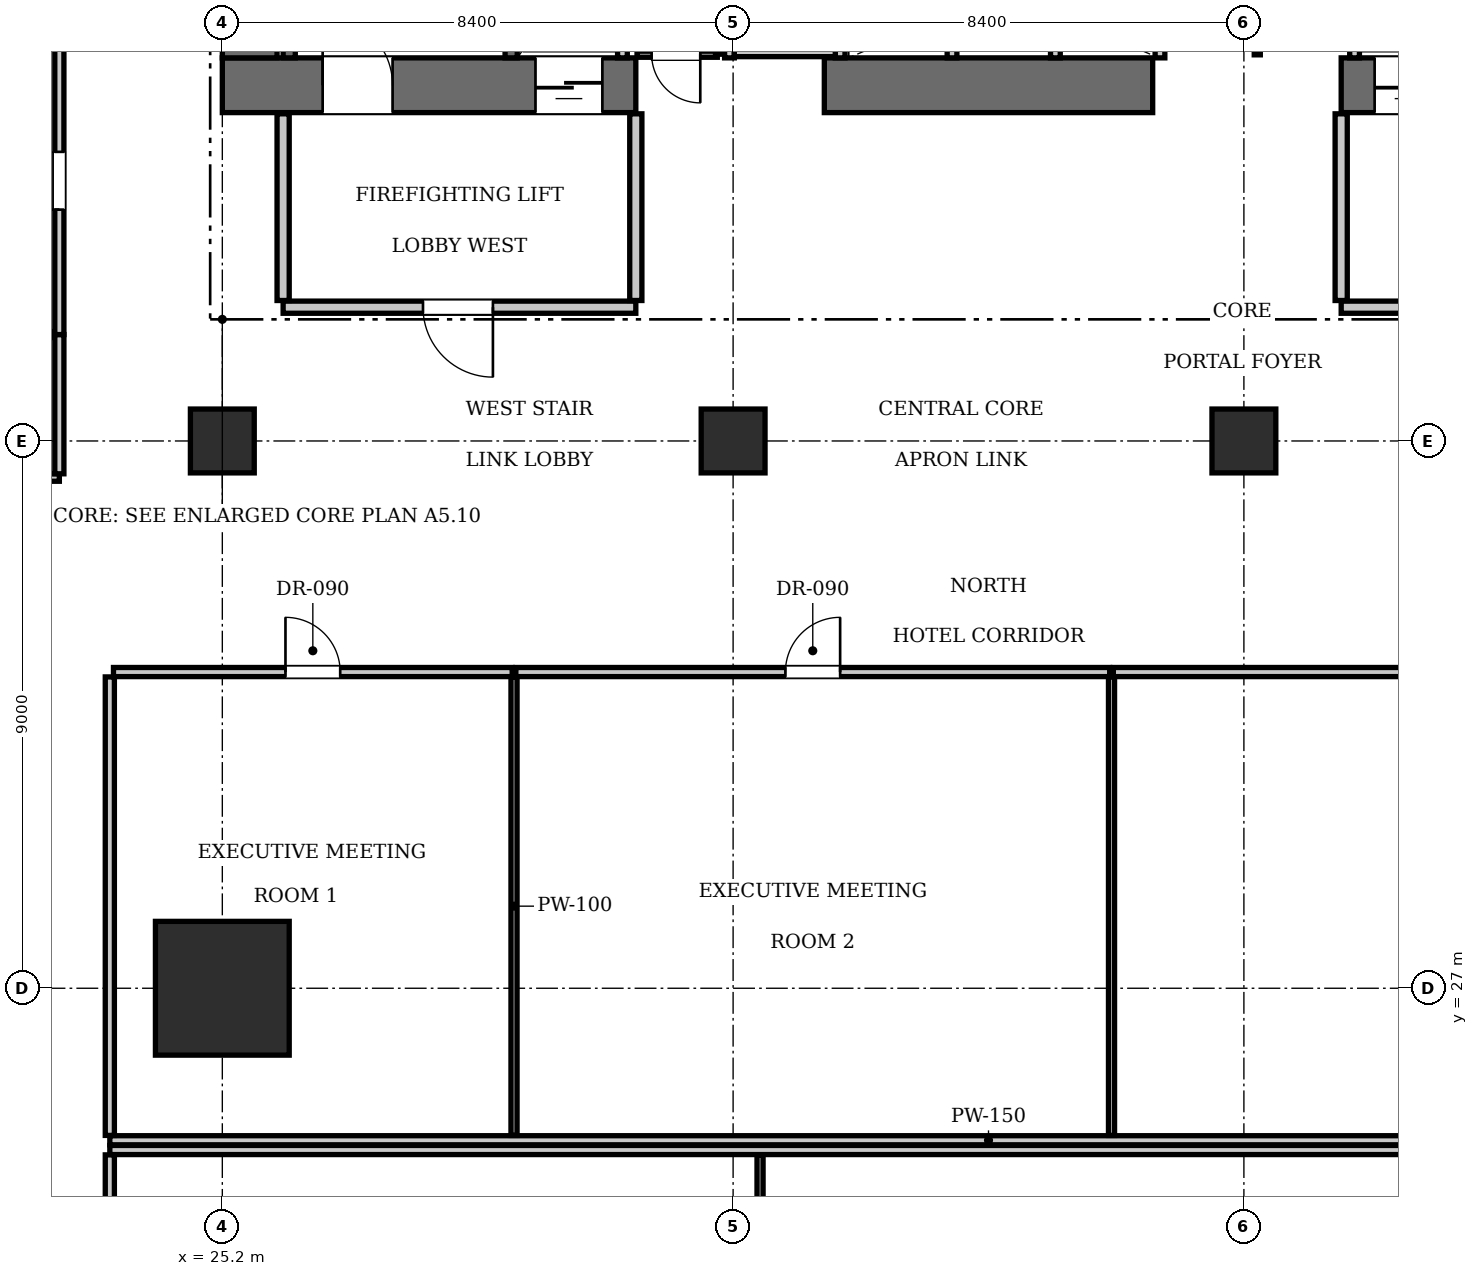
"""IFC4 building model, lengths in metres.
Left out: names, types, materials, properties, quantities, classifications, styles, units other than length and angle.
Written with IfcOpenShell. Run it as: python <this file> out.ifc"""

import sys

from ifc_helpers import new_model, si_unit, direction, frame, frame_2d, origin, origin_2d, place, context, subcontext, project, spatial, rectangle, extrude, element, fill, save


model = new_model("IFC4")
c1 = context("Model", 3, precision=1e-05, world=origin(), true_north=direction((0.0, 1.0)))
c2 = subcontext(c1, "Body", "Model", "MODEL_VIEW")
j1 = project(units=[si_unit("LENGTHUNIT", "METRE"), si_unit("PLANEANGLEUNIT", "RADIAN")], contexts=[c1])
p1 = place(None, origin())
s1 = spatial("IfcSite", under=j1, at=p1, CompositionType="ELEMENT")
p2 = place(p1, origin())
s2 = spatial("IfcBuilding", under=s1, at=p2, CompositionType="ELEMENT")
p3 = place(p2, frame((0.0, 0.0, 46.2)))
s3 = spatial("IfcBuildingStorey", under=s2, at=p3, CompositionType="ELEMENT", Elevation=46.2)
p4 = place(p3, frame((25.2, 27.0, 0.0), z_axis=(0.0, 0.0, 1.0), x_axis=(1.0, 0.0, 0.0)))
e1 = element("IfcColumn", 1, at=p4, inside=s3, PredefinedType="COLUMN", context=c2, shape_type="SweptSolid", body=[
    extrude(rectangle(XDim=2.2, YDim=2.2, at=origin_2d()), origin(), (0.0, 0.0, 1.0), 3.85),
])
p5 = place(p3, frame((25.2, 41.85, 0.0), z_axis=(0.0, 0.0, 1.0), x_axis=(1.0, 0.0, 0.0)))
e2 = element("IfcWall", 2, at=p5, inside=s3, PredefinedType="SHEAR", context=c2, shape_type="SweptSolid", body=[
    extrude(rectangle(XDim=6.8, YDim=0.9, at=frame_2d((3.4, 0.0))), origin(), (0.0, 0.0, 1.0), 3.85),
])
p6 = place(p5, frame((1.65, 0.0, 0.0)))
e3 = element("IfcOpeningElement", 3, at=p6, cuts=e2, PredefinedType="OPENING", context=c2, shape_type="SweptSolid", body=[
    extrude(rectangle(XDim=1.15, YDim=2.15, at=frame_2d((0.575, 1.075))), frame((0.0, 0.46, 0.0), z_axis=(0.0, -1.0, 0.0), x_axis=(1.0, 0.0, 0.0)), (0.0, 0.0, 1.0), 0.92),
])
p7 = place(p5, frame((5.15, 0.0, 0.0)))
e4 = element("IfcOpeningElement", 4, at=p7, cuts=e2, PredefinedType="OPENING", context=c2, shape_type="SweptSolid", body=[
    extrude(rectangle(XDim=1.1, YDim=2.2, at=frame_2d((0.55, 1.1))), frame((0.0, 0.46, 0.0), z_axis=(0.0, -1.0, 0.0), x_axis=(1.0, 0.0, 0.0)), (0.0, 0.0, 1.0), 0.92),
])
p8 = place(p3, frame((35.1, 41.85, 0.0), z_axis=(0.0, 0.0, 1.0), x_axis=(1.0, 0.0, 0.0)))
e5 = element("IfcWall", 5, at=p8, inside=s3, PredefinedType="SHEAR", context=c2, shape_type="SweptSolid", body=[
    extrude(rectangle(XDim=5.4, YDim=0.9, at=frame_2d((2.7, 0.0))), origin(), (0.0, 0.0, 1.0), 3.85),
])
p9 = place(p3, frame((43.6, 41.85, 0.0), z_axis=(0.0, 0.0, 1.0), x_axis=(1.0, 0.0, 0.0)))
e6 = element("IfcWall", 6, at=p9, inside=s3, PredefinedType="SHEAR", context=c2, shape_type="SweptSolid", body=[
    extrude(rectangle(XDim=6.8, YDim=0.9, at=frame_2d((3.4, 0.0))), origin(), (0.0, 0.0, 1.0), 3.85),
])
p10 = place(p9, frame((3.9, 0.0, 0.0)))
e7 = element("IfcOpeningElement", 7, at=p10, cuts=e6, PredefinedType="OPENING", context=c2, shape_type="SweptSolid", body=[
    extrude(rectangle(XDim=1.15, YDim=2.15, at=frame_2d((0.575, 1.075))), frame((0.0, 0.46, 0.0), z_axis=(0.0, -1.0, 0.0), x_axis=(1.0, 0.0, 0.0)), (0.0, 0.0, 1.0), 0.92),
])
p11 = place(p9, frame((0.55, 0.0, 0.0)))
e8 = element("IfcOpeningElement", 8, at=p11, cuts=e6, PredefinedType="OPENING", context=c2, shape_type="SweptSolid", body=[
    extrude(rectangle(XDim=1.1, YDim=2.2, at=frame_2d((0.55, 1.1))), frame((0.0, 0.46, 0.0), z_axis=(0.0, -1.0, 0.0), x_axis=(1.0, 0.0, 0.0)), (0.0, 0.0, 1.0), 0.92),
])
p12 = place(p3, frame((25.65, 42.3, 0.0), z_axis=(0.0, 0.0, 1.0), x_axis=(0.0, 1.0, 0.0)))
e9 = element("IfcWall", 9, at=p12, inside=s3, PredefinedType="SHEAR", context=c2, shape_type="SweptSolid", body=[
    extrude(rectangle(XDim=1.6, YDim=0.9, at=frame_2d((0.8, 0.0))), origin(), (0.0, 0.0, 1.0), 3.85),
])
for number, where, z_axis, x_axis in (
    (10, (25.2, 36.0, 0.0), (0.0, 0.0, 1.0), (1.0, 0.0, 0.0)),
    (11, (33.6, 36.0, 0.0), (0.0, 0.0, 1.0), (1.0, 0.0, 0.0)),
    (12, (42.0, 36.0, 0.0), (0.0, 0.0, 1.0), (1.0, 0.0, 0.0)),
):
    element("IfcColumn", number, at=place(p3, frame(where, z_axis=z_axis, x_axis=x_axis)), inside=s3, PredefinedType="COLUMN", context=c2, shape_type="SweptSolid", body=[
        extrude(rectangle(XDim=1.05, YDim=1.05, at=origin_2d()), origin(), (0.0, 0.0, 1.0), 3.85),
    ])
p13 = place(p3, frame((29.95, 42.3, 0.0), z_axis=(0.0, 0.0, 1.0), x_axis=(0.0, 1.0, 0.0)))
e13 = element("IfcWall", 13, at=p13, inside=s3, PredefinedType="SOLIDWALL", context=c2, shape_type="SweptSolid", body=[
    extrude(rectangle(XDim=8.85, YDim=0.2, at=frame_2d((4.425, 0.0))), origin(), (0.0, 0.0, 1.0), 3.61),
])
p14 = place(p3, frame((26.3, 42.3, 0.0), z_axis=(0.0, 0.0, 1.0), x_axis=(0.0, 1.0, 0.0)))
e14 = element("IfcWall", 14, at=p14, inside=s3, PredefinedType="SOLIDWALL", context=c2, shape_type="SweptSolid", body=[
    extrude(rectangle(XDim=1.58, YDim=0.2, at=frame_2d((0.79, 0.0))), origin(), (0.0, 0.0, 1.0), 3.61),
])
for number, where, z_axis, x_axis in (
    (15, (31.78, 42.3, 0.0), (0.0, 0.0, 1.0), (0.0, 1.0, 0.0)),
    (16, (43.82, 42.3, 0.0), (0.0, 0.0, 1.0), (0.0, 1.0, 0.0)),
):
    element("IfcWall", number, at=place(p3, frame(where, z_axis=z_axis, x_axis=x_axis)), inside=s3, PredefinedType="SOLIDWALL", context=c2, shape_type="SweptSolid", body=[
        extrude(rectangle(XDim=2.44, YDim=0.16, at=frame_2d((1.22, 0.0))), origin(), (0.0, 0.0, 1.0), 3.61),
    ])
for number, where, z_axis, x_axis in (
    (17, (37.2, 42.3, 0.0), (0.0, 0.0, 1.0), (0.0, 1.0, 0.0)),
    (18, (38.9, 42.3, 0.0), (0.0, 0.0, 1.0), (0.0, 1.0, 0.0)),
    (19, (40.62, 42.3, 0.0), (0.0, 0.0, 1.0), (0.0, 1.0, 0.0)),
):
    element("IfcWall", number, at=place(p3, frame(where, z_axis=z_axis, x_axis=x_axis)), inside=s3, PredefinedType="SOLIDWALL", context=c2, shape_type="SweptSolid", body=[
        extrude(rectangle(XDim=2.05, YDim=0.16, at=frame_2d((1.025, 0.0))), origin(), (0.0, 0.0, 1.0), 3.61),
    ])
for number, where, z_axis, x_axis in (
    (20, (33.54, 42.3, 0.0), (0.0, 0.0, 1.0), (0.0, 1.0, 0.0)),
    (21, (35.36, 42.3, 0.0), (0.0, 0.0, 1.0), (0.0, 1.0, 0.0)),
):
    element("IfcWall", number, at=place(p3, frame(where, z_axis=z_axis, x_axis=x_axis)), inside=s3, PredefinedType="SOLIDWALL", context=c2, shape_type="SweptSolid", body=[
        extrude(rectangle(XDim=2.1, YDim=0.16, at=frame_2d((1.05, 0.0))), origin(), (0.0, 0.0, 1.0), 3.61),
    ])
p15 = place(p3, frame((33.62, 42.4, 0.0), z_axis=(0.0, 0.0, 1.0), x_axis=(1.0, 0.0, 0.0)))
e22 = element("IfcWall", 22, at=p15, inside=s3, PredefinedType="SOLIDWALL", context=c2, shape_type="SweptSolid", body=[
    extrude(rectangle(XDim=1.66, YDim=0.16, at=frame_2d((0.83, 0.0))), origin(), (0.0, 0.0, 1.0), 3.61),
])
p16 = place(p3, frame((26.2, 38.2, 0.0), z_axis=(0.0, 0.0, 1.0), x_axis=(1.0, 0.0, 0.0)))
e23 = element("IfcWall", 23, at=p16, inside=s3, PredefinedType="PARTITIONING", context=c2, shape_type="SweptSolid", body=[
    extrude(rectangle(XDim=5.8, YDim=0.2, at=frame_2d((2.9, 0.0))), origin(), (0.0, 0.0, 1.0), 3.61),
])
p17 = place(p16, frame((2.3, 0.0, 0.0)))
e24 = element("IfcOpeningElement", 24, at=p17, cuts=e23, PredefinedType="OPENING", context=c2, shape_type="SweptSolid", body=[
    extrude(rectangle(XDim=1.15, YDim=2.15, at=frame_2d((0.575, 1.075))), frame((0.0, 0.11, 0.0), z_axis=(0.0, -1.0, 0.0), x_axis=(1.0, 0.0, 0.0)), (0.0, 0.0, 1.0), 0.22),
])
for number, where, z_axis, x_axis in (
    (25, (26.2, 38.31, 0.0), (0.0, 0.0, 1.0), (0.0, 1.0, 0.0)),
    (26, (32.0, 38.31, 0.0), (0.0, 0.0, 1.0), (0.0, 1.0, 0.0)),
):
    element("IfcWall", number, at=place(p3, frame(where, z_axis=z_axis, x_axis=x_axis)), inside=s3, PredefinedType="PARTITIONING", context=c2, shape_type="SweptSolid", body=[
        extrude(rectangle(XDim=3.07, YDim=0.2, at=frame_2d((1.535, 0.0))), origin(), (0.0, 0.0, 1.0), 3.61),
    ])
p18 = place(p3, frame((43.6, 38.2, 0.0), z_axis=(0.0, 0.0, 1.0), x_axis=(1.0, 0.0, 0.0)))
e27 = element("IfcWall", 27, at=p18, inside=s3, PredefinedType="PARTITIONING", context=c2, shape_type="SweptSolid", body=[
    extrude(rectangle(XDim=5.8, YDim=0.2, at=frame_2d((2.9, 0.0))), origin(), (0.0, 0.0, 1.0), 3.61),
])
p19 = place(p18, frame((2.3, 0.0, 0.0)))
e28 = element("IfcOpeningElement", 28, at=p19, cuts=e27, PredefinedType="OPENING", context=c2, shape_type="SweptSolid", body=[
    extrude(rectangle(XDim=1.15, YDim=2.15, at=frame_2d((0.575, 1.075))), frame((0.0, 0.11, 0.0), z_axis=(0.0, -1.0, 0.0), x_axis=(1.0, 0.0, 0.0)), (0.0, 0.0, 1.0), 0.22),
])
p20 = place(p3, frame((43.6, 38.31, 0.0), z_axis=(0.0, 0.0, 1.0), x_axis=(0.0, 1.0, 0.0)))
e29 = element("IfcWall", 29, at=p20, inside=s3, PredefinedType="PARTITIONING", context=c2, shape_type="SweptSolid", body=[
    extrude(rectangle(XDim=3.07, YDim=0.2, at=frame_2d((1.535, 0.0))), origin(), (0.0, 0.0, 1.0), 3.61),
])
p21 = place(p3, frame((32.02, 42.36, 0.0), z_axis=(0.0, 0.0, 1.0), x_axis=(1.0, 0.0, 0.0)))
e30 = element("IfcWall", 30, at=p21, inside=s3, PredefinedType="PARTITIONING", context=c2, shape_type="SweptSolid", body=[
    extrude(rectangle(XDim=1.32, YDim=0.1, at=frame_2d((0.66, 0.0))), origin(), (0.0, 0.0, 1.0), 3.61),
])
p22 = place(p21, frame((0.24, 0.0, 0.0)))
e31 = element("IfcOpeningElement", 31, at=p22, cuts=e30, PredefinedType="OPENING", context=c2, shape_type="SweptSolid", body=[
    extrude(rectangle(XDim=0.8, YDim=2.05, at=frame_2d((0.4, 1.025))), frame((0.0, 0.06, 0.0), z_axis=(0.0, -1.0, 0.0), x_axis=(1.0, 0.0, 0.0)), (0.0, 0.0, 1.0), 0.12),
])
p23 = place(p3, frame((33.36, 42.36, 0.0), z_axis=(0.0, 0.0, 1.0), x_axis=(0.0, 1.0, 0.0)))
e32 = element("IfcWall", 32, at=p23, inside=s3, PredefinedType="PARTITIONING", context=c2, shape_type="SweptSolid", body=[
    extrude(rectangle(XDim=2.58, YDim=0.1, at=frame_2d((1.29, 0.0))), origin(), (0.0, 0.0, 1.0), 3.61),
])
p24 = place(p3, frame((42.22, 42.35, 0.0), z_axis=(0.0, 0.0, 1.0), x_axis=(0.0, 1.0, 0.0)))
e33 = element("IfcWall", 33, at=p24, inside=s3, PredefinedType="PARTITIONING", context=c2, shape_type="SweptSolid", body=[
    extrude(rectangle(XDim=2.61, YDim=0.1, at=frame_2d((1.305, 0.0))), origin(), (0.0, 0.0, 1.0), 3.61),
])
p25 = place(p24, frame((0.65, 0.0, 0.0)))
e34 = element("IfcOpeningElement", 34, at=p25, cuts=e33, PredefinedType="OPENING", context=c2, shape_type="SweptSolid", body=[
    extrude(rectangle(XDim=0.8, YDim=2.05, at=frame_2d((0.4, 1.025))), frame((0.0, 0.06, 0.0), z_axis=(0.0, -1.0, 0.0), x_axis=(1.0, 0.0, 0.0)), (0.0, 0.0, 1.0), 0.12),
])
p26 = place(p3, frame((23.35, 24.5, 0.0), z_axis=(0.0, 0.0, 1.0), x_axis=(1.0, 0.0, 0.0)))
e35 = element("IfcWall", 35, at=p26, inside=s3, PredefinedType="PARTITIONING", context=c2, shape_type="SweptSolid", body=[
    extrude(rectangle(XDim=28.9, YDim=0.15, at=frame_2d((14.45, 0.0))), origin(), (0.0, 0.0, 1.0), 3.61),
])
p27 = place(p3, frame((23.35, 24.58, 0.0), z_axis=(0.0, 0.0, 1.0), x_axis=(0.0, 1.0, 0.0)))
e36 = element("IfcWall", 36, at=p27, inside=s3, PredefinedType="PARTITIONING", context=c2, shape_type="SweptSolid", body=[
    extrude(rectangle(XDim=7.54, YDim=0.15, at=frame_2d((3.77, 0.0))), origin(), (0.0, 0.0, 1.0), 3.61),
])
p28 = place(p3, frame((23.41, 32.2, 0.0), z_axis=(0.0, 0.0, 1.0), x_axis=(1.0, 0.0, 0.0)))
e37 = element("IfcWall", 37, at=p28, inside=s3, PredefinedType="PARTITIONING", context=c2, shape_type="SweptSolid", body=[
    extrude(rectangle(XDim=6.557, YDim=0.15, at=frame_2d((3.279, 0.0))), origin(), (0.0, 0.0, 1.0), 3.61),
])
p29 = place(p28, frame((2.829, 0.0, 0.0)))
e38 = element("IfcOpeningElement", 38, at=p29, cuts=e37, PredefinedType="OPENING", context=c2, shape_type="SweptSolid", body=[
    extrude(rectangle(XDim=0.9, YDim=2.1, at=frame_2d((0.45, 1.05))), frame((0.0, 0.085, 0.0), z_axis=(0.0, -1.0, 0.0), x_axis=(1.0, 0.0, 0.0)), (0.0, 0.0, 1.0), 0.17),
])
p30 = place(p3, frame((29.997, 24.58, 0.0), z_axis=(0.0, 0.0, 1.0), x_axis=(0.0, 1.0, 0.0)))
e39 = element("IfcWall", 39, at=p30, inside=s3, PredefinedType="PARTITIONING", context=c2, shape_type="SweptSolid", body=[
    extrude(rectangle(XDim=7.54, YDim=0.1, at=frame_2d((3.77, 0.0))), origin(), (0.0, 0.0, 1.0), 3.61),
])
p31 = place(p3, frame((30.027, 32.2, 0.0), z_axis=(0.0, 0.0, 1.0), x_axis=(1.0, 0.0, 0.0)))
e40 = element("IfcWall", 40, at=p31, inside=s3, PredefinedType="PARTITIONING", context=c2, shape_type="SweptSolid", body=[
    extrude(rectangle(XDim=9.766, YDim=0.15, at=frame_2d((4.883, 0.0))), origin(), (0.0, 0.0, 1.0), 3.61),
])
p32 = place(p31, frame((4.433, 0.0, 0.0)))
e41 = element("IfcOpeningElement", 41, at=p32, cuts=e40, PredefinedType="OPENING", context=c2, shape_type="SweptSolid", body=[
    extrude(rectangle(XDim=0.9, YDim=2.1, at=frame_2d((0.45, 1.05))), frame((0.0, 0.085, 0.0), z_axis=(0.0, -1.0, 0.0), x_axis=(1.0, 0.0, 0.0)), (0.0, 0.0, 1.0), 0.17),
])
p33 = place(p3, frame((39.823, 24.58, 0.0), z_axis=(0.0, 0.0, 1.0), x_axis=(0.0, 1.0, 0.0)))
e42 = element("IfcWall", 42, at=p33, inside=s3, PredefinedType="PARTITIONING", context=c2, shape_type="SweptSolid", body=[
    extrude(rectangle(XDim=7.54, YDim=0.1, at=frame_2d((3.77, 0.0))), origin(), (0.0, 0.0, 1.0), 3.61),
])
p34 = place(p3, frame((39.853, 32.2, 0.0), z_axis=(0.0, 0.0, 1.0), x_axis=(1.0, 0.0, 0.0)))
e43 = element("IfcWall", 43, at=p34, inside=s3, PredefinedType="PARTITIONING", context=c2, shape_type="SweptSolid", body=[
    extrude(rectangle(XDim=12.337, YDim=0.15, at=frame_2d((6.168, 0.0))), origin(), (0.0, 0.0, 1.0), 3.61),
])
p35 = place(p34, frame((5.719, 0.0, 0.0)))
e44 = element("IfcOpeningElement", 44, at=p35, cuts=e43, PredefinedType="OPENING", context=c2, shape_type="SweptSolid", body=[
    extrude(rectangle(XDim=0.9, YDim=2.1, at=frame_2d((0.45, 1.05))), frame((0.0, 0.085, 0.0), z_axis=(0.0, -1.0, 0.0), x_axis=(1.0, 0.0, 0.0)), (0.0, 0.0, 1.0), 0.17),
])
p36 = place(p3, frame((23.35, 24.34, 0.0), z_axis=(0.0, 0.0, 1.0), x_axis=(1.0, 0.0, 0.0)))
e45 = element("IfcWall", 45, at=p36, inside=s3, PredefinedType="PARTITIONING", context=c2, shape_type="SweptSolid", body=[
    extrude(rectangle(XDim=28.9, YDim=0.15, at=frame_2d((14.45, 0.0))), origin(), (0.0, 0.0, 1.0), 3.61),
])
p37 = place(p3, frame((23.35, 16.73, 0.0), z_axis=(0.0, 0.0, 1.0), x_axis=(0.0, 1.0, 0.0)))
e46 = element("IfcWall", 46, at=p37, inside=s3, PredefinedType="PARTITIONING", context=c2, shape_type="SweptSolid", body=[
    extrude(rectangle(XDim=7.53, YDim=0.15, at=frame_2d((3.765, 0.0))), origin(), (0.0, 0.0, 1.0), 3.61),
])
p38 = place(p3, frame((34.043, 16.73, 0.0), z_axis=(0.0, 0.0, 1.0), x_axis=(0.0, 1.0, 0.0)))
e47 = element("IfcWall", 47, at=p38, inside=s3, PredefinedType="PARTITIONING", context=c2, shape_type="SweptSolid", body=[
    extrude(rectangle(XDim=7.53, YDim=0.1, at=frame_2d((3.765, 0.0))), origin(), (0.0, 0.0, 1.0), 3.61),
])
p39 = place(p3, frame((10.9, 35.4, 0.0), z_axis=(0.0, 0.0, 1.0), x_axis=(1.0, 0.0, 0.0)))
e48 = element("IfcWall", 48, at=p39, inside=s3, PredefinedType="PARTITIONING", context=c2, shape_type="SweptSolid", body=[
    extrude(rectangle(XDim=11.62, YDim=0.125, at=frame_2d((5.81, 0.0))), origin(), (0.0, 0.0, 1.0), 3.61),
])
p40 = place(p3, frame((22.52, 35.46, 0.0), z_axis=(0.0, 0.0, 1.0), x_axis=(0.0, 1.0, 0.0)))
e49 = element("IfcWall", 49, at=p40, inside=s3, PredefinedType="PARTITIONING", context=c2, shape_type="SweptSolid", body=[
    extrude(rectangle(XDim=2.29, YDim=0.15, at=frame_2d((1.145, 0.0))), origin(), (0.0, 0.0, 1.0), 3.61),
])
p41 = place(p3, frame((22.52, 37.75, 0.0), z_axis=(0.0, 0.0, 1.0), x_axis=(0.0, 1.0, 0.0)))
e50 = element("IfcWall", 50, at=p41, inside=s3, PredefinedType="PARTITIONING", context=c2, shape_type="SweptSolid", body=[
    extrude(rectangle(XDim=5.059, YDim=0.15, at=frame_2d((2.529, 0.0))), origin(), (0.0, 0.0, 1.0), 3.61),
])
p42 = place(p41, frame((2.054, 0.0, 0.0)))
e51 = element("IfcOpeningElement", 51, at=p42, cuts=e50, PredefinedType="OPENING", context=c2, shape_type="SweptSolid", body=[
    extrude(rectangle(XDim=0.95, YDim=2.15, at=frame_2d((0.475, 1.075))), frame((0.0, 0.085, 0.0), z_axis=(0.0, -1.0, 0.0), x_axis=(1.0, 0.0, 0.0)), (0.0, 0.0, 1.0), 0.17),
])
p43 = place(p3, frame((20.12, 37.75, 0.0), z_axis=(0.0, 0.0, 1.0), x_axis=(1.0, 0.0, 0.0)))
e52 = element("IfcWall", 52, at=p43, inside=s3, PredefinedType="PARTITIONING", context=c2, shape_type="SweptSolid", body=[
    extrude(rectangle(XDim=2.3, YDim=0.1, at=frame_2d((1.15, 0.0))), origin(), (0.0, 0.0, 1.0), 3.61),
])
p44 = place(p43, frame((0.35, 0.0, 0.0)))
e53 = element("IfcOpeningElement", 53, at=p44, cuts=e52, PredefinedType="OPENING", context=c2, shape_type="SweptSolid", body=[
    extrude(rectangle(XDim=0.85, YDim=2.1, at=frame_2d((0.425, 1.05))), frame((0.0, 0.06, 0.0), z_axis=(0.0, -1.0, 0.0), x_axis=(1.0, 0.0, 0.0)), (0.0, 0.0, 1.0), 0.12),
])
p45 = place(p6, origin())
e54 = element("IfcDoor", 54, at=p45, inside=s3, OperationType="SINGLE_SWING_LEFT", PredefinedType="DOOR", context=c2, shape_type="SweptSolid", body=[
    extrude(rectangle(XDim=1.15, YDim=2.15, at=frame_2d((0.575, 1.075))), frame((0.0, 0.025, 0.0), z_axis=(0.0, -1.0, 0.0), x_axis=(1.0, 0.0, 0.0)), (0.0, 0.0, 1.0), 0.05),
])
fill(e3, e54)
p46 = place(p7, frame((1.1, 0.0, 0.0), z_axis=(0.0, 0.0, 1.0), x_axis=(-1.0, 0.0, 0.0)))
e55 = element("IfcDoor", 55, at=p46, inside=s3, OperationType="SLIDING_TO_LEFT", PredefinedType="DOOR", context=c2, shape_type="SweptSolid", body=[
    extrude(rectangle(XDim=1.1, YDim=2.2, at=frame_2d((0.55, 1.1))), frame((0.0, 0.025, 0.0), z_axis=(0.0, -1.0, 0.0), x_axis=(1.0, 0.0, 0.0)), (0.0, 0.0, 1.0), 0.05),
])
fill(e4, e55)
p47 = place(p11, frame((1.1, 0.0, 0.0), z_axis=(0.0, 0.0, 1.0), x_axis=(-1.0, 0.0, 0.0)))
e56 = element("IfcDoor", 56, at=p47, inside=s3, OperationType="SLIDING_TO_LEFT", PredefinedType="DOOR", context=c2, shape_type="SweptSolid", body=[
    extrude(rectangle(XDim=1.1, YDim=2.2, at=frame_2d((0.55, 1.1))), frame((0.0, 0.025, 0.0), z_axis=(0.0, -1.0, 0.0), x_axis=(1.0, 0.0, 0.0)), (0.0, 0.0, 1.0), 0.05),
])
fill(e8, e56)
p48 = place(p17, frame((1.15, 0.0, 0.0), z_axis=(0.0, 0.0, 1.0), x_axis=(-1.0, 0.0, 0.0)))
e57 = element("IfcDoor", 57, at=p48, inside=s3, OperationType="SINGLE_SWING_LEFT", PredefinedType="DOOR", context=c2, shape_type="SweptSolid", body=[
    extrude(rectangle(XDim=1.15, YDim=2.15, at=frame_2d((0.575, 1.075))), frame((0.0, 0.025, 0.0), z_axis=(0.0, -1.0, 0.0), x_axis=(1.0, 0.0, 0.0)), (0.0, 0.0, 1.0), 0.05),
])
fill(e24, e57)
p49 = place(p22, frame((0.8, 0.0, 0.0), z_axis=(0.0, 0.0, 1.0), x_axis=(-1.0, 0.0, 0.0)))
e58 = element("IfcDoor", 58, at=p49, inside=s3, OperationType="SINGLE_SWING_LEFT", PredefinedType="DOOR", context=c2, shape_type="SweptSolid", body=[
    extrude(rectangle(XDim=0.8, YDim=2.05, at=frame_2d((0.4, 1.025))), frame((0.0, 0.025, 0.0), z_axis=(0.0, -1.0, 0.0), x_axis=(1.0, 0.0, 0.0)), (0.0, 0.0, 1.0), 0.05),
])
fill(e31, e58)
p50 = place(p29, origin())
e59 = element("IfcDoor", 59, at=p50, inside=s3, OperationType="SINGLE_SWING_LEFT", PredefinedType="DOOR", context=c2, shape_type="SweptSolid", body=[
    extrude(rectangle(XDim=0.9, YDim=2.1, at=frame_2d((0.45, 1.05))), frame((0.0, 0.025, 0.0), z_axis=(0.0, -1.0, 0.0), x_axis=(1.0, 0.0, 0.0)), (0.0, 0.0, 1.0), 0.05),
])
fill(e38, e59)
p51 = place(p32, origin())
e60 = element("IfcDoor", 60, at=p51, inside=s3, OperationType="SINGLE_SWING_RIGHT", PredefinedType="DOOR", context=c2, shape_type="SweptSolid", body=[
    extrude(rectangle(XDim=0.9, YDim=2.1, at=frame_2d((0.45, 1.05))), frame((0.0, 0.025, 0.0), z_axis=(0.0, -1.0, 0.0), x_axis=(1.0, 0.0, 0.0)), (0.0, 0.0, 1.0), 0.05),
])
fill(e41, e60)
p52 = place(p42, origin())
e61 = element("IfcDoor", 61, at=p52, inside=s3, OperationType="SINGLE_SWING_LEFT", PredefinedType="DOOR", context=c2, shape_type="SweptSolid", body=[
    extrude(rectangle(XDim=0.95, YDim=2.15, at=frame_2d((0.475, 1.075))), frame((0.0, 0.025, 0.0), z_axis=(0.0, -1.0, 0.0), x_axis=(1.0, 0.0, 0.0)), (0.0, 0.0, 1.0), 0.05),
])
fill(e51, e61)
save(model, sys.argv[1])
